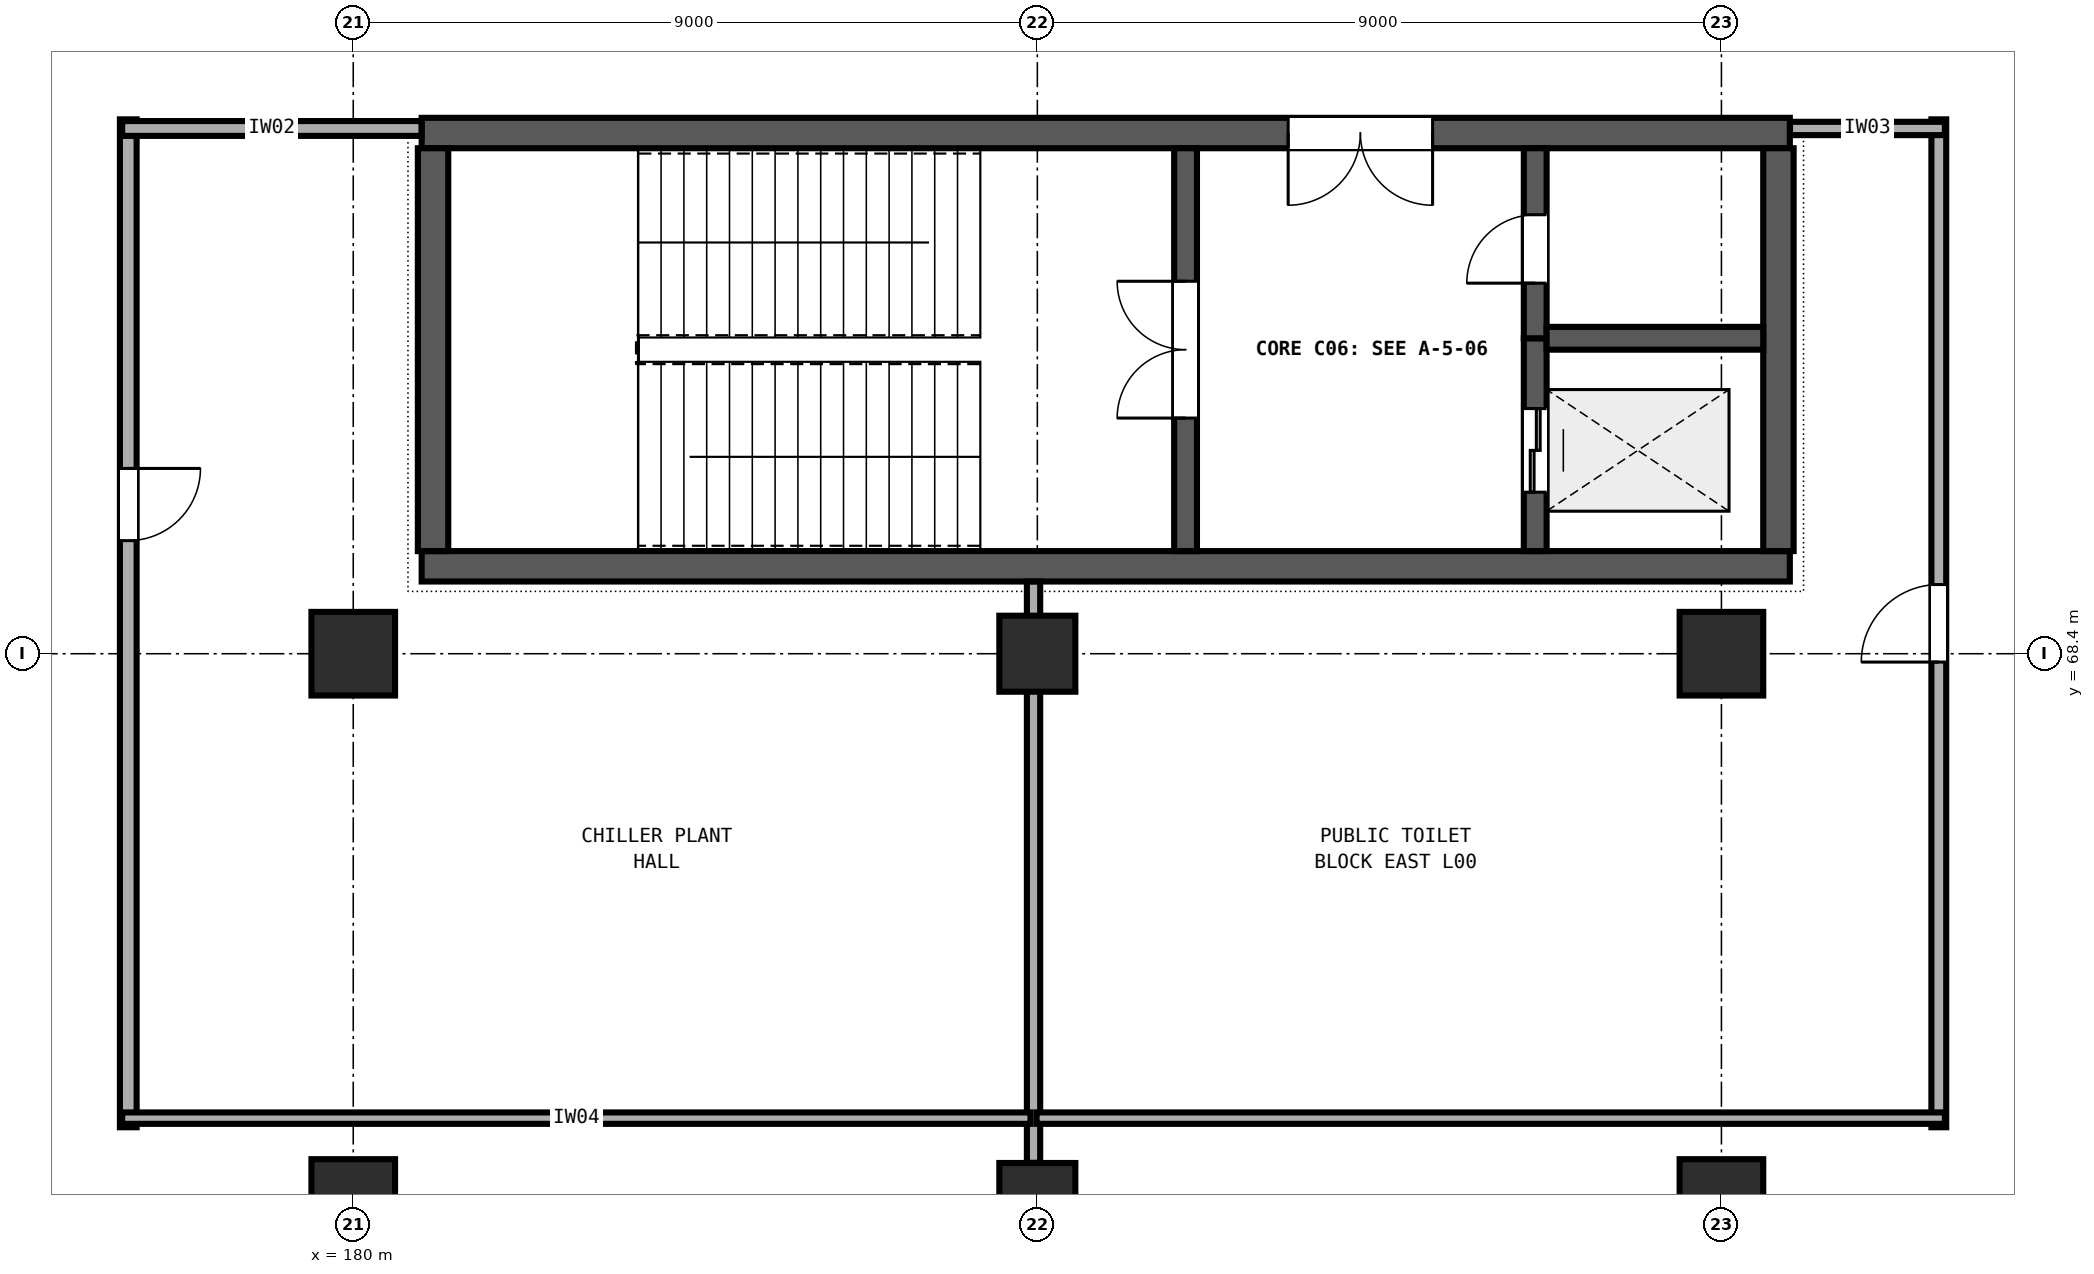
"""IFC4 building model, lengths in metres.
Left out: names, types, materials, properties, quantities, classifications, styles, units other than length and angle.
Written with IfcOpenShell. Run it as: python <this file> out.ifc"""

import sys

from ifc_helpers import new_model, si_unit, direction, frame, frame_2d, origin, origin_2d, place, context, subcontext, project, spatial, rectangle, extrude, element, fill, save


model = new_model("IFC4")
c1 = context("Model", 3, precision=1e-05, world=origin(), true_north=direction((0.0, 1.0)))
c2 = subcontext(c1, "Body", "Model", "MODEL_VIEW")
j1 = project(units=[si_unit("LENGTHUNIT", "METRE"), si_unit("PLANEANGLEUNIT", "RADIAN")], contexts=[c1])
p1 = place(None, origin())
s1 = spatial("IfcSite", under=j1, at=p1, CompositionType="ELEMENT")
p2 = place(p1, origin())
s2 = spatial("IfcBuilding", under=s1, at=p2, CompositionType="ELEMENT")
p3 = place(p2, origin())
s3 = spatial("IfcBuildingStorey", under=s2, at=p3, CompositionType="ELEMENT", Elevation=0.0)
for number, where, z_axis, x_axis in (
    (1, (180.0, 61.2, 0.0), (0.0, 0.0, 1.0), (1.0, 0.0, 0.0)),
    (2, (180.0, 68.4, 0.0), (0.0, 0.0, 1.0), (1.0, 0.0, 0.0)),
):
    element("IfcColumn", number, at=place(p3, frame(where, z_axis=z_axis, x_axis=x_axis)), inside=s3, PredefinedType="COLUMN", context=c2, shape_type="SweptSolid", body=[
        extrude(rectangle(XDim=1.1, YDim=1.1, at=origin_2d()), origin(), (0.0, 0.0, 1.0), 4.8),
    ])
for number, where, z_axis, x_axis in (
    (3, (189.0, 61.2, 0.0), (0.0, 0.0, 1.0), (1.0, 0.0, 0.0)),
    (4, (189.0, 68.4, 0.0), (0.0, 0.0, 1.0), (1.0, 0.0, 0.0)),
):
    element("IfcColumn", number, at=place(p3, frame(where, z_axis=z_axis, x_axis=x_axis)), inside=s3, PredefinedType="COLUMN", context=c2, shape_type="SweptSolid", body=[
        extrude(rectangle(XDim=1.0, YDim=1.0, at=origin_2d()), origin(), (0.0, 0.0, 1.0), 4.8),
    ])
for number, where, z_axis, x_axis in (
    (5, (198.0, 61.2, 0.0), (0.0, 0.0, 1.0), (1.0, 0.0, 0.0)),
    (6, (198.0, 68.4, 0.0), (0.0, 0.0, 1.0), (1.0, 0.0, 0.0)),
):
    element("IfcColumn", number, at=place(p3, frame(where, z_axis=z_axis, x_axis=x_axis)), inside=s3, PredefinedType="COLUMN", context=c2, shape_type="SweptSolid", body=[
        extrude(rectangle(XDim=1.1, YDim=1.1, at=origin_2d()), origin(), (0.0, 0.0, 1.0), 4.8),
    ])
p4 = place(p3, frame((180.9, 69.55, 0.0), z_axis=(0.0, 0.0, 1.0), x_axis=(1.0, 0.0, 0.0)))
e7 = element("IfcWall", 7, at=p4, inside=s3, PredefinedType="SHEAR", context=c2, shape_type="SweptSolid", body=[
    extrude(rectangle(XDim=18.0, YDim=0.4, at=frame_2d((9.0, 0.0))), origin(), (0.0, 0.0, 1.0), 4.5),
])
p5 = place(p3, frame((198.9, 75.25, 0.0), z_axis=(0.0, 0.0, 1.0), x_axis=(-1.0, 0.0, 0.0)))
e8 = element("IfcWall", 8, at=p5, inside=s3, PredefinedType="SHEAR", context=c2, shape_type="SweptSolid", body=[
    extrude(rectangle(XDim=18.0, YDim=0.4, at=frame_2d((9.0, 0.0))), origin(), (0.0, 0.0, 1.0), 4.5),
])
p6 = place(p5, frame((4.7, 0.0, 0.0)))
e9 = element("IfcOpeningElement", 9, at=p6, cuts=e8, PredefinedType="OPENING", context=c2, shape_type="SweptSolid", body=[
    extrude(rectangle(XDim=1.9, YDim=2.25, at=frame_2d((0.95, 1.125))), frame((0.0, 0.21, 0.0), z_axis=(0.0, -1.0, 0.0), x_axis=(1.0, 0.0, 0.0)), (0.0, 0.0, 1.0), 0.42),
])
for number, where, z_axis, x_axis in (
    (10, (181.05, 75.05, 0.0), (0.0, 0.0, 1.0), (0.0, -1.0, 0.0)),
    (11, (198.75, 69.75, 0.0), (0.0, 0.0, 1.0), (0.0, 1.0, 0.0)),
):
    element("IfcWall", number, at=place(p3, frame(where, z_axis=z_axis, x_axis=x_axis)), inside=s3, PredefinedType="SHEAR", context=c2, shape_type="SweptSolid", body=[
        extrude(rectangle(XDim=5.3, YDim=0.4, at=frame_2d((2.65, 0.0))), origin(), (0.0, 0.0, 1.0), 4.5),
    ])
p7 = place(p3, frame((190.95, 69.75, 0.0), z_axis=(0.0, 0.0, 1.0), x_axis=(0.0, 1.0, 0.0)))
e12 = element("IfcWall", 12, at=p7, inside=s3, PredefinedType="SHEAR", context=c2, shape_type="SweptSolid", body=[
    extrude(rectangle(XDim=5.3, YDim=0.3, at=frame_2d((2.65, 0.0))), origin(), (0.0, 0.0, 1.0), 4.5),
])
p8 = place(p7, frame((1.75, 0.0, 0.0)))
e13 = element("IfcOpeningElement", 13, at=p8, cuts=e12, PredefinedType="OPENING", context=c2, shape_type="SweptSolid", body=[
    extrude(rectangle(XDim=1.8, YDim=2.25, at=frame_2d((0.9, 1.125))), frame((0.0, 0.16, 0.0), z_axis=(0.0, -1.0, 0.0), x_axis=(1.0, 0.0, 0.0)), (0.0, 0.0, 1.0), 0.32),
])
p9 = place(p3, frame((195.55, 69.75, 0.0), z_axis=(0.0, 0.0, 1.0), x_axis=(0.0, 1.0, 0.0)))
e14 = element("IfcWall", 14, at=p9, inside=s3, PredefinedType="SHEAR", context=c2, shape_type="SweptSolid", body=[
    extrude(rectangle(XDim=2.8, YDim=0.3, at=frame_2d((1.4, 0.0))), origin(), (0.0, 0.0, 1.0), 4.5),
])
p10 = place(p9, frame((0.775, 0.0, 0.0)))
e15 = element("IfcOpeningElement", 15, at=p10, cuts=e14, PredefinedType="OPENING", context=c2, shape_type="SweptSolid", body=[
    extrude(rectangle(XDim=1.1, YDim=2.1, at=frame_2d((0.55, 1.05))), frame((0.0, 0.16, 0.0), z_axis=(0.0, -1.0, 0.0), x_axis=(1.0, 0.0, 0.0)), (0.0, 0.0, 1.0), 0.32),
])
p11 = place(p3, frame((195.55, 72.55, 0.0), z_axis=(0.0, 0.0, 1.0), x_axis=(0.0, 1.0, 0.0)))
e16 = element("IfcWall", 16, at=p11, inside=s3, PredefinedType="SHEAR", context=c2, shape_type="SweptSolid", body=[
    extrude(rectangle(XDim=2.5, YDim=0.3, at=frame_2d((1.25, 0.0))), origin(), (0.0, 0.0, 1.0), 4.5),
])
p12 = place(p11, frame((0.725, 0.0, 0.0)))
e17 = element("IfcOpeningElement", 17, at=p12, cuts=e16, PredefinedType="OPENING", context=c2, shape_type="SweptSolid", body=[
    extrude(rectangle(XDim=0.9, YDim=2.1, at=frame_2d((0.45, 1.05))), frame((0.0, 0.16, 0.0), z_axis=(0.0, -1.0, 0.0), x_axis=(1.0, 0.0, 0.0)), (0.0, 0.0, 1.0), 0.32),
])
p13 = place(p3, frame((195.7, 72.55, 0.0), z_axis=(0.0, 0.0, 1.0), x_axis=(1.0, 0.0, 0.0)))
e18 = element("IfcWall", 18, at=p13, inside=s3, PredefinedType="SHEAR", context=c2, shape_type="SweptSolid", body=[
    extrude(rectangle(XDim=2.85, YDim=0.3, at=frame_2d((1.425, 0.0))), origin(), (0.0, 0.0, 1.0), 4.5),
])
p14 = place(p3, frame((177.04, 75.43, 0.0), z_axis=(0.0, 0.0, 1.0), x_axis=(0.0, -1.0, 0.0)))
e19 = element("IfcWall", 19, at=p14, inside=s3, PredefinedType="PARTITIONING", context=c2, shape_type="SweptSolid", body=[
    extrude(rectangle(XDim=13.26, YDim=0.22, at=frame_2d((6.63, 0.0))), origin(), (0.0, 0.0, 1.0), 3.28),
])
p15 = place(p14, frame((4.593, 0.0, 0.0)))
e20 = element("IfcOpeningElement", 20, at=p15, cuts=e19, PredefinedType="OPENING", context=c2, shape_type="SweptSolid", body=[
    extrude(rectangle(XDim=0.95, YDim=2.1, at=frame_2d((0.475, 1.05))), frame((0.0, 0.12, 0.0), z_axis=(0.0, -1.0, 0.0), x_axis=(1.0, 0.0, 0.0)), (0.0, 0.0, 1.0), 0.24),
])
p16 = place(p3, frame((176.96, 75.31, 0.0), z_axis=(0.0, 0.0, 1.0), x_axis=(1.0, 0.0, 0.0)))
e21 = element("IfcWall", 21, at=p16, inside=s3, PredefinedType="PARTITIONING", context=c2, shape_type="SweptSolid", body=[
    extrude(rectangle(XDim=3.938, YDim=0.195, at=frame_2d((1.969, 0.0))), origin(), (0.0, 0.0, 1.0), 3.28),
])
p17 = place(p3, frame((188.95, 69.348, 0.0), z_axis=(0.0, 0.0, 1.0), x_axis=(0.0, -1.0, 0.0)))
e22 = element("IfcWall", 22, at=p17, inside=s3, PredefinedType="PARTITIONING", context=c2, shape_type="SweptSolid", body=[
    extrude(rectangle(XDim=7.646, YDim=0.175, at=frame_2d((3.823, 0.0))), origin(), (0.0, 0.0, 1.0), 3.28),
])
p18 = place(p3, frame((188.91, 62.29, 0.0), z_axis=(0.0, 0.0, 1.0), x_axis=(-1.0, 0.0, 0.0)))
e23 = element("IfcWall", 23, at=p18, inside=s3, PredefinedType="PARTITIONING", context=c2, shape_type="SweptSolid", body=[
    extrude(rectangle(XDim=11.95, YDim=0.15, at=frame_2d((5.975, 0.0))), origin(), (0.0, 0.0, 1.0), 3.28),
])
p19 = place(p3, frame((200.86, 62.17, 0.0), z_axis=(0.0, 0.0, 1.0), x_axis=(0.0, 1.0, 0.0)))
e24 = element("IfcWall", 24, at=p19, inside=s3, PredefinedType="PARTITIONING", context=c2, shape_type="SweptSolid", body=[
    extrude(rectangle(XDim=13.26, YDim=0.195, at=frame_2d((6.63, 0.0))), origin(), (0.0, 0.0, 1.0), 3.28),
])
p20 = place(p19, frame((6.12, 0.0, 0.0)))
e25 = element("IfcOpeningElement", 25, at=p20, cuts=e24, PredefinedType="OPENING", context=c2, shape_type="SweptSolid", body=[
    extrude(rectangle(XDim=1.02, YDim=2.16, at=frame_2d((0.51, 1.08))), frame((0.0, 0.107, 0.0), z_axis=(0.0, -1.0, 0.0), x_axis=(1.0, 0.0, 0.0)), (0.0, 0.0, 1.0), 0.215),
])
p21 = place(p3, frame((198.902, 75.31, 0.0), z_axis=(0.0, 0.0, 1.0), x_axis=(1.0, 0.0, 0.0)))
e26 = element("IfcWall", 26, at=p21, inside=s3, PredefinedType="PARTITIONING", context=c2, shape_type="SweptSolid", body=[
    extrude(rectangle(XDim=2.038, YDim=0.175, at=frame_2d((1.019, 0.0))), origin(), (0.0, 0.0, 1.0), 3.28),
])
p22 = place(p3, frame((200.94, 62.29, 0.0), z_axis=(0.0, 0.0, 1.0), x_axis=(-1.0, 0.0, 0.0)))
e27 = element("IfcWall", 27, at=p22, inside=s3, PredefinedType="PARTITIONING", context=c2, shape_type="SweptSolid", body=[
    extrude(rectangle(XDim=11.95, YDim=0.15, at=frame_2d((5.975, 0.0))), origin(), (0.0, 0.0, 1.0), 3.28),
])
p23 = place(p8, origin())
e28 = element("IfcDoor", 28, at=p23, inside=s3, OperationType="DOUBLE_DOOR_SINGLE_SWING", PredefinedType="DOOR", context=c2, shape_type="SweptSolid", body=[
    extrude(rectangle(XDim=1.8, YDim=2.25, at=frame_2d((0.9, 1.125))), frame((0.0, 0.025, 0.0), z_axis=(0.0, -1.0, 0.0), x_axis=(1.0, 0.0, 0.0)), (0.0, 0.0, 1.0), 0.05),
])
fill(e13, e28)
p24 = place(p12, origin())
e29 = element("IfcDoor", 29, at=p24, inside=s3, OperationType="SINGLE_SWING_LEFT", PredefinedType="DOOR", context=c2, shape_type="SweptSolid", body=[
    extrude(rectangle(XDim=0.9, YDim=2.1, at=frame_2d((0.45, 1.05))), frame((0.0, 0.025, 0.0), z_axis=(0.0, -1.0, 0.0), x_axis=(1.0, 0.0, 0.0)), (0.0, 0.0, 1.0), 0.05),
])
fill(e17, e29)
p25 = place(p10, origin())
e30 = element("IfcDoor", 30, at=p25, inside=s3, OperationType="DOUBLE_DOOR_SLIDING", PredefinedType="DOOR", context=c2, shape_type="SweptSolid", body=[
    extrude(rectangle(XDim=1.1, YDim=2.1, at=frame_2d((0.55, 1.05))), frame((0.0, 0.025, 0.0), z_axis=(0.0, -1.0, 0.0), x_axis=(1.0, 0.0, 0.0)), (0.0, 0.0, 1.0), 0.05),
])
fill(e15, e30)
p26 = place(p6, origin())
e31 = element("IfcDoor", 31, at=p26, inside=s3, OperationType="DOUBLE_DOOR_SINGLE_SWING", PredefinedType="DOOR", context=c2, shape_type="SweptSolid", body=[
    extrude(rectangle(XDim=1.9, YDim=2.25, at=frame_2d((0.95, 1.125))), frame((0.0, 0.025, 0.0), z_axis=(0.0, -1.0, 0.0), x_axis=(1.0, 0.0, 0.0)), (0.0, 0.0, 1.0), 0.05),
])
fill(e9, e31)
p27 = place(p15, origin())
e32 = element("IfcDoor", 32, at=p27, inside=s3, OperationType="SINGLE_SWING_LEFT", PredefinedType="DOOR", context=c2, shape_type="SweptSolid", body=[
    extrude(rectangle(XDim=0.95, YDim=2.1, at=frame_2d((0.475, 1.05))), frame((0.0, 0.025, 0.0), z_axis=(0.0, -1.0, 0.0), x_axis=(1.0, 0.0, 0.0)), (0.0, 0.0, 1.0), 0.05),
])
fill(e20, e32)
p28 = place(p20, origin())
e33 = element("IfcDoor", 33, at=p28, inside=s3, OperationType="SINGLE_SWING_LEFT", PredefinedType="DOOR", context=c2, shape_type="SweptSolid", body=[
    extrude(rectangle(XDim=1.02, YDim=2.16, at=frame_2d((0.51, 1.08))), frame((0.0, 0.025, 0.0), z_axis=(0.0, -1.0, 0.0), x_axis=(1.0, 0.0, 0.0)), (0.0, 0.0, 1.0), 0.05),
])
fill(e25, e33)
save(model, sys.argv[1])
